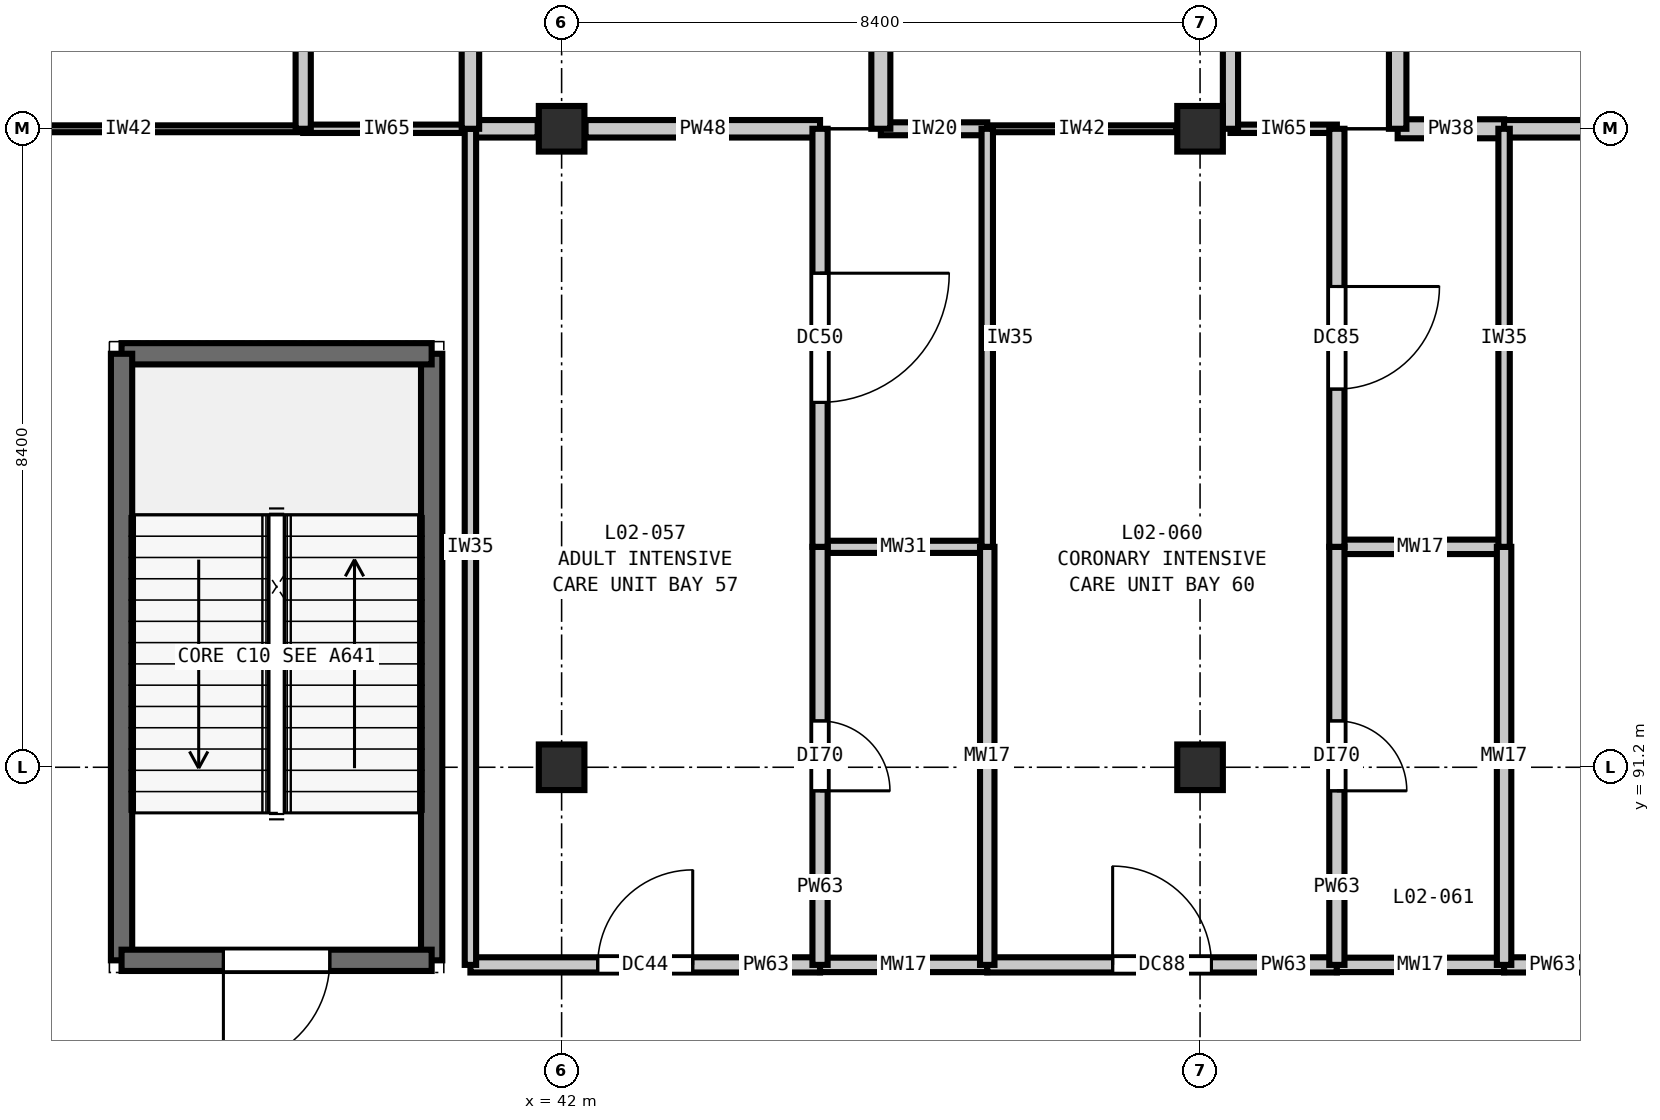
"""IFC4 building model, lengths in metres.
Left out: names, types, materials, properties, quantities, classifications, styles, units other than length and angle.
Written with IfcOpenShell. Run it as: python <this file> out.ifc"""

import sys

from ifc_helpers import new_model, si_unit, direction, frame, frame_2d, origin, origin_2d, place, context, subcontext, project, spatial, rectangle, extrude, element, fill, save


model = new_model("IFC4")
c1 = context("Model", 3, precision=1e-05, world=origin(), true_north=direction((0.0, 1.0)))
c2 = subcontext(c1, "Body", "Model", "MODEL_VIEW")
j1 = project(units=[si_unit("LENGTHUNIT", "METRE"), si_unit("PLANEANGLEUNIT", "RADIAN")], contexts=[c1])
p1 = place(None, origin())
s1 = spatial("IfcSite", under=j1, at=p1, CompositionType="ELEMENT")
p2 = place(p1, origin())
s2 = spatial("IfcBuilding", under=s1, at=p2, CompositionType="ELEMENT")
p3 = place(p2, frame((0.0, 0.0, 10.8)))
s3 = spatial("IfcBuildingStorey", under=s2, at=p3, CompositionType="ELEMENT", Elevation=10.8)
for number, where, z_axis, x_axis in (
    (1, (42.0, 91.2, 0.0), (0.0, 0.0, 1.0), (1.0, 0.0, 0.0)),
    (2, (42.0, 99.6, 0.0), (0.0, 0.0, 1.0), (1.0, 0.0, 0.0)),
    (3, (50.4, 91.2, 0.0), (0.0, 0.0, 1.0), (1.0, 0.0, 0.0)),
    (4, (50.4, 99.6, 0.0), (0.0, 0.0, 1.0), (1.0, 0.0, 0.0)),
):
    element("IfcColumn", number, at=place(p3, frame(where, z_axis=z_axis, x_axis=x_axis)), inside=s3, PredefinedType="COLUMN", context=c2, shape_type="SweptSolid", body=[
        extrude(rectangle(XDim=0.6, YDim=0.6, at=origin_2d()), origin(), (0.0, 0.0, 1.0), 5.4),
    ])
p4 = place(p3, frame((40.29, 88.66, 0.0), z_axis=(0.0, 0.0, 1.0), x_axis=(0.0, 1.0, 0.0)))
e5 = element("IfcWall", 5, at=p4, inside=s3, PredefinedType="SHEAR", context=c2, shape_type="SweptSolid", body=[
    extrude(rectangle(XDim=7.98, YDim=0.28, at=frame_2d((3.99, 0.0))), origin(), (0.0, 0.0, 1.0), 5.4),
])
p5 = place(p3, frame((40.29, 96.64, 0.0), z_axis=(0.0, 0.0, 1.0), x_axis=(-1.0, 0.0, 0.0)))
e6 = element("IfcWall", 6, at=p5, inside=s3, PredefinedType="SHEAR", context=c2, shape_type="SweptSolid", body=[
    extrude(rectangle(XDim=4.08, YDim=0.28, at=frame_2d((2.04, 0.0))), origin(), (0.0, 0.0, 1.0), 5.4),
])
p6 = place(p3, frame((36.21, 96.64, 0.0), z_axis=(0.0, 0.0, 1.0), x_axis=(0.0, -1.0, 0.0)))
e7 = element("IfcWall", 7, at=p6, inside=s3, PredefinedType="SHEAR", context=c2, shape_type="SweptSolid", body=[
    extrude(rectangle(XDim=7.98, YDim=0.28, at=frame_2d((3.99, 0.0))), origin(), (0.0, 0.0, 1.0), 5.4),
])
p7 = place(p3, frame((36.21, 88.66, 0.0), z_axis=(0.0, 0.0, 1.0), x_axis=(1.0, 0.0, 0.0)))
e8 = element("IfcWall", 8, at=p7, inside=s3, PredefinedType="SHEAR", context=c2, shape_type="SweptSolid", body=[
    extrude(rectangle(XDim=4.08, YDim=0.28, at=frame_2d((2.04, 0.0))), origin(), (0.0, 0.0, 1.0), 5.4),
])
p8 = place(p7, frame((1.34, 0.0, 0.0)))
e9 = element("IfcOpeningElement", 9, at=p8, cuts=e8, PredefinedType="OPENING", context=c2, shape_type="SweptSolid", body=[
    extrude(rectangle(XDim=1.4, YDim=2.2, at=frame_2d((0.7, 1.1))), frame((0.0, 0.15, 0.0), z_axis=(0.0, -1.0, 0.0), x_axis=(1.0, 0.0, 0.0)), (0.0, 0.0, 1.0), 0.3),
])
p9 = place(p3, frame((40.8, 88.6, 0.0), z_axis=(0.0, 0.0, 1.0), x_axis=(1.0, 0.0, 0.0)))
e10 = element("IfcWall", 10, at=p9, inside=s3, PredefinedType="PARTITIONING", context=c2, shape_type="SweptSolid", body=[
    extrude(rectangle(XDim=4.6, YDim=0.2, at=frame_2d((2.3, 0.0))), origin(), (0.0, 0.0, 1.0), 5.07),
])
p10 = place(p9, frame((1.675, 0.0, 0.0)))
e11 = element("IfcOpeningElement", 11, at=p10, cuts=e10, PredefinedType="OPENING", context=c2, shape_type="SweptSolid", body=[
    extrude(rectangle(XDim=1.25, YDim=2.15, at=frame_2d((0.625, 1.075))), frame((0.0, 0.11, 0.0), z_axis=(0.0, -1.0, 0.0), x_axis=(1.0, 0.0, 0.0)), (0.0, 0.0, 1.0), 0.22),
])
p11 = place(p3, frame((45.4, 88.6, 0.0), z_axis=(0.0, 0.0, 1.0), x_axis=(1.0, 0.0, 0.0)))
e12 = element("IfcWall", 12, at=p11, inside=s3, PredefinedType="PLUMBINGWALL", context=c2, shape_type="SweptSolid", body=[
    extrude(rectangle(XDim=2.2, YDim=0.19, at=frame_2d((1.1, 0.0))), origin(), (0.0, 0.0, 1.0), 5.07),
])
p12 = place(p3, frame((47.6, 88.6, 0.0), z_axis=(0.0, 0.0, 1.0), x_axis=(1.0, 0.0, 0.0)))
e13 = element("IfcWall", 13, at=p12, inside=s3, PredefinedType="PARTITIONING", context=c2, shape_type="SweptSolid", body=[
    extrude(rectangle(XDim=4.6, YDim=0.2, at=frame_2d((2.3, 0.0))), origin(), (0.0, 0.0, 1.0), 5.07),
])
p13 = place(p12, frame((1.65, 0.0, 0.0)))
e14 = element("IfcOpeningElement", 14, at=p13, cuts=e13, PredefinedType="OPENING", context=c2, shape_type="SweptSolid", body=[
    extrude(rectangle(XDim=1.3, YDim=2.2, at=frame_2d((0.65, 1.1))), frame((0.0, 0.11, 0.0), z_axis=(0.0, -1.0, 0.0), x_axis=(1.0, 0.0, 0.0)), (0.0, 0.0, 1.0), 0.22),
])
p14 = place(p3, frame((52.2, 88.6, 0.0), z_axis=(0.0, 0.0, 1.0), x_axis=(1.0, 0.0, 0.0)))
e15 = element("IfcWall", 15, at=p14, inside=s3, PredefinedType="PLUMBINGWALL", context=c2, shape_type="SweptSolid", body=[
    extrude(rectangle(XDim=2.2, YDim=0.19, at=frame_2d((1.1, 0.0))), origin(), (0.0, 0.0, 1.0), 5.07),
])
p15 = place(p3, frame((54.4, 88.6, 0.0), z_axis=(0.0, 0.0, 1.0), x_axis=(1.0, 0.0, 0.0)))
e16 = element("IfcWall", 16, at=p15, inside=s3, PredefinedType="PARTITIONING", context=c2, shape_type="SweptSolid", body=[
    extrude(rectangle(XDim=4.4, YDim=0.2, at=frame_2d((2.2, 0.0))), origin(), (0.0, 0.0, 1.0), 5.07),
])
p16 = place(p15, frame((1.525, 0.0, 0.0)))
e17 = element("IfcOpeningElement", 17, at=p16, cuts=e16, PredefinedType="OPENING", context=c2, shape_type="SweptSolid", body=[
    extrude(rectangle(XDim=1.35, YDim=2.2, at=frame_2d((0.675, 1.1))), frame((0.0, 0.11, 0.0), z_axis=(0.0, -1.0, 0.0), x_axis=(1.0, 0.0, 0.0)), (0.0, 0.0, 1.0), 0.22),
])
p17 = place(p3, frame((45.4, 94.1, 0.0), z_axis=(0.0, 0.0, 1.0), x_axis=(1.0, 0.0, 0.0)))
e18 = element("IfcWall", 18, at=p17, inside=s3, PredefinedType="PLUMBINGWALL", context=c2, shape_type="SweptSolid", body=[
    extrude(rectangle(XDim=2.2, YDim=0.16, at=frame_2d((1.1, 0.0))), origin(), (0.0, 0.0, 1.0), 5.07),
])
p18 = place(p3, frame((52.2, 94.1, 0.0), z_axis=(0.0, 0.0, 1.0), x_axis=(1.0, 0.0, 0.0)))
e19 = element("IfcWall", 19, at=p18, inside=s3, PredefinedType="PLUMBINGWALL", context=c2, shape_type="SweptSolid", body=[
    extrude(rectangle(XDim=2.2, YDim=0.19, at=frame_2d((1.1, 0.0))), origin(), (0.0, 0.0, 1.0), 5.07),
])
p19 = place(p3, frame((34.0, 99.6, 0.0), z_axis=(0.0, 0.0, 1.0), x_axis=(1.0, 0.0, 0.0)))
e20 = element("IfcWall", 20, at=p19, inside=s3, PredefinedType="PARTITIONING", context=c2, shape_type="SweptSolid", body=[
    extrude(rectangle(XDim=4.6, YDim=0.09, at=frame_2d((2.3, 0.0))), origin(), (0.0, 0.0, 1.0), 4.735),
])
p20 = place(p3, frame((38.6, 99.6, 0.0), z_axis=(0.0, 0.0, 1.0), x_axis=(1.0, 0.0, 0.0)))
e21 = element("IfcWall", 21, at=p20, inside=s3, PredefinedType="PARTITIONING", context=c2, shape_type="SweptSolid", body=[
    extrude(rectangle(XDim=2.2, YDim=0.11, at=frame_2d((1.1, 0.0))), origin(), (0.0, 0.0, 1.0), 4.735),
])
p21 = place(p3, frame((42.315, 99.6, 0.0), z_axis=(0.0, 0.0, 1.0), x_axis=(1.0, 0.0, 0.0)))
e22 = element("IfcWall", 22, at=p21, inside=s3, PredefinedType="PARTITIONING", context=c2, shape_type="SweptSolid", body=[
    extrude(rectangle(XDim=3.085, YDim=0.23, at=frame_2d((1.542, 0.0))), origin(), (0.0, 0.0, 1.0), 4.735),
])
p22 = place(p3, frame((40.8, 99.6, 0.0), z_axis=(0.0, 0.0, 1.0), x_axis=(1.0, 0.0, 0.0)))
e23 = element("IfcWall", 23, at=p22, inside=s3, PredefinedType="PARTITIONING", context=c2, shape_type="SweptSolid", body=[
    extrude(rectangle(XDim=0.885, YDim=0.23, at=frame_2d((0.442, 0.0))), origin(), (0.0, 0.0, 1.0), 4.735),
])
p23 = place(p3, frame((46.2, 99.6, 0.0), z_axis=(0.0, 0.0, 1.0), x_axis=(1.0, 0.0, 0.0)))
e24 = element("IfcWall", 24, at=p23, inside=s3, PredefinedType="PARTITIONING", context=c2, shape_type="SweptSolid", body=[
    extrude(rectangle(XDim=1.4, YDim=0.17, at=frame_2d((0.7, 0.0))), origin(), (0.0, 0.0, 1.0), 4.735),
])
p24 = place(p3, frame((47.6, 99.6, 0.0), z_axis=(0.0, 0.0, 1.0), x_axis=(1.0, 0.0, 0.0)))
e25 = element("IfcWall", 25, at=p24, inside=s3, PredefinedType="PARTITIONING", context=c2, shape_type="SweptSolid", body=[
    extrude(rectangle(XDim=2.485, YDim=0.09, at=frame_2d((1.242, 0.0))), origin(), (0.0, 0.0, 1.0), 4.735),
])
p25 = place(p3, frame((50.8, 99.6, 0.0), z_axis=(0.0, 0.0, 1.0), x_axis=(1.0, 0.0, 0.0)))
e26 = element("IfcWall", 26, at=p25, inside=s3, PredefinedType="PARTITIONING", context=c2, shape_type="SweptSolid", body=[
    extrude(rectangle(XDim=1.4, YDim=0.11, at=frame_2d((0.7, 0.0))), origin(), (0.0, 0.0, 1.0), 4.735),
])
p26 = place(p3, frame((53.0, 99.6, 0.0), z_axis=(0.0, 0.0, 1.0), x_axis=(1.0, 0.0, 0.0)))
e27 = element("IfcWall", 27, at=p26, inside=s3, PredefinedType="PARTITIONING", context=c2, shape_type="SweptSolid", body=[
    extrude(rectangle(XDim=1.4, YDim=0.25, at=frame_2d((0.7, 0.0))), origin(), (0.0, 0.0, 1.0), 4.735),
])
p27 = place(p3, frame((54.4, 99.6, 0.0), z_axis=(0.0, 0.0, 1.0), x_axis=(1.0, 0.0, 0.0)))
e28 = element("IfcWall", 28, at=p27, inside=s3, PredefinedType="PARTITIONING", context=c2, shape_type="SweptSolid", body=[
    extrude(rectangle(XDim=4.0, YDim=0.23, at=frame_2d((2.0, 0.0))), origin(), (0.0, 0.0, 1.0), 4.735),
])
p28 = place(p3, frame((38.6, 99.6, 0.0), z_axis=(0.0, 0.0, 1.0), x_axis=(0.0, 1.0, 0.0)))
e29 = element("IfcWall", 29, at=p28, inside=s3, PredefinedType="PARTITIONING", context=c2, shape_type="SweptSolid", body=[
    extrude(rectangle(XDim=6.8, YDim=0.2, at=frame_2d((3.4, 0.0))), origin(), (0.0, 0.0, 1.0), 5.07),
])
p29 = place(p28, frame((2.725, 0.0, 0.0)))
e30 = element("IfcOpeningElement", 30, at=p29, cuts=e29, PredefinedType="OPENING", context=c2, shape_type="SweptSolid", body=[
    extrude(rectangle(XDim=1.35, YDim=2.2, at=frame_2d((0.675, 1.1))), frame((0.0, 0.11, 0.0), z_axis=(0.0, -1.0, 0.0), x_axis=(1.0, 0.0, 0.0)), (0.0, 0.0, 1.0), 0.22),
])
p30 = place(p3, frame((40.8, 88.6, 0.0), z_axis=(0.0, 0.0, 1.0), x_axis=(0.0, 1.0, 0.0)))
e31 = element("IfcWall", 31, at=p30, inside=s3, PredefinedType="PARTITIONING", context=c2, shape_type="SweptSolid", body=[
    extrude(rectangle(XDim=11.0, YDim=0.15, at=frame_2d((5.5, 0.0))), origin(), (0.0, 0.0, 1.0), 5.07),
])
p31 = place(p3, frame((40.8, 99.6, 0.0), z_axis=(0.0, 0.0, 1.0), x_axis=(0.0, 1.0, 0.0)))
e32 = element("IfcWall", 32, at=p31, inside=s3, PredefinedType="PARTITIONING", context=c2, shape_type="SweptSolid", body=[
    extrude(rectangle(XDim=6.8, YDim=0.23, at=frame_2d((3.4, 0.0))), origin(), (0.0, 0.0, 1.0), 5.07),
])
p32 = place(p3, frame((45.4, 88.6, 0.0), z_axis=(0.0, 0.0, 1.0), x_axis=(0.0, 1.0, 0.0)))
e33 = element("IfcWall", 33, at=p32, inside=s3, PredefinedType="PARTITIONING", context=c2, shape_type="SweptSolid", body=[
    extrude(rectangle(XDim=5.5, YDim=0.2, at=frame_2d((2.75, 0.0))), origin(), (0.0, 0.0, 1.0), 5.07),
])
p33 = place(p32, frame((2.29, 0.0, 0.0)))
e34 = element("IfcOpeningElement", 34, at=p33, cuts=e33, PredefinedType="OPENING", context=c2, shape_type="SweptSolid", body=[
    extrude(rectangle(XDim=0.92, YDim=2.1, at=frame_2d((0.46, 1.05))), frame((0.0, 0.11, 0.0), z_axis=(0.0, -1.0, 0.0), x_axis=(1.0, 0.0, 0.0)), (0.0, 0.0, 1.0), 0.22),
])
p34 = place(p3, frame((45.4, 94.1, 0.0), z_axis=(0.0, 0.0, 1.0), x_axis=(0.0, 1.0, 0.0)))
e35 = element("IfcWall", 35, at=p34, inside=s3, PredefinedType="PARTITIONING", context=c2, shape_type="SweptSolid", body=[
    extrude(rectangle(XDim=5.5, YDim=0.2, at=frame_2d((2.75, 0.0))), origin(), (0.0, 0.0, 1.0), 5.07),
])
p35 = place(p34, frame((1.9, 0.0, 0.0)))
e36 = element("IfcOpeningElement", 36, at=p35, cuts=e35, PredefinedType="OPENING", context=c2, shape_type="SweptSolid", body=[
    extrude(rectangle(XDim=1.7, YDim=2.3, at=frame_2d((0.85, 1.15))), frame((0.0, 0.11, 0.0), z_axis=(0.0, -1.0, 0.0), x_axis=(1.0, 0.0, 0.0)), (0.0, 0.0, 1.0), 0.22),
])
p36 = place(p3, frame((46.2, 99.6, 0.0), z_axis=(0.0, 0.0, 1.0), x_axis=(0.0, 1.0, 0.0)))
e37 = element("IfcWall", 37, at=p36, inside=s3, PredefinedType="PARTITIONING", context=c2, shape_type="SweptSolid", body=[
    extrude(rectangle(XDim=13.6, YDim=0.25, at=frame_2d((6.8, 0.0))), origin(), (0.0, 0.0, 1.0), 5.07),
])
p37 = place(p3, frame((47.6, 88.6, 0.0), z_axis=(0.0, 0.0, 1.0), x_axis=(0.0, 1.0, 0.0)))
e38 = element("IfcWall", 38, at=p37, inside=s3, PredefinedType="PLUMBINGWALL", context=c2, shape_type="SweptSolid", body=[
    extrude(rectangle(XDim=5.5, YDim=0.19, at=frame_2d((2.75, 0.0))), origin(), (0.0, 0.0, 1.0), 5.07),
])
p38 = place(p3, frame((47.6, 94.1, 0.0), z_axis=(0.0, 0.0, 1.0), x_axis=(0.0, 1.0, 0.0)))
e39 = element("IfcWall", 39, at=p38, inside=s3, PredefinedType="PARTITIONING", context=c2, shape_type="SweptSolid", body=[
    extrude(rectangle(XDim=5.5, YDim=0.15, at=frame_2d((2.75, 0.0))), origin(), (0.0, 0.0, 1.0), 5.07),
])
p39 = place(p3, frame((50.8, 99.6, 0.0), z_axis=(0.0, 0.0, 1.0), x_axis=(0.0, 1.0, 0.0)))
e40 = element("IfcWall", 40, at=p39, inside=s3, PredefinedType="PARTITIONING", context=c2, shape_type="SweptSolid", body=[
    extrude(rectangle(XDim=6.8, YDim=0.2, at=frame_2d((3.4, 0.0))), origin(), (0.0, 0.0, 1.0), 5.07),
])
p40 = place(p39, frame((3.816, 0.0, 0.0)))
e41 = element("IfcOpeningElement", 41, at=p40, cuts=e40, PredefinedType="OPENING", context=c2, shape_type="SweptSolid", body=[
    extrude(rectangle(XDim=1.85, YDim=2.3, at=frame_2d((0.925, 1.15))), frame((0.0, 0.11, 0.0), z_axis=(0.0, -1.0, 0.0), x_axis=(1.0, 0.0, 0.0)), (0.0, 0.0, 1.0), 0.22),
])
p41 = place(p3, frame((52.2, 88.6, 0.0), z_axis=(0.0, 0.0, 1.0), x_axis=(0.0, 1.0, 0.0)))
e42 = element("IfcWall", 42, at=p41, inside=s3, PredefinedType="PARTITIONING", context=c2, shape_type="SweptSolid", body=[
    extrude(rectangle(XDim=5.5, YDim=0.2, at=frame_2d((2.75, 0.0))), origin(), (0.0, 0.0, 1.0), 5.07),
])
p42 = place(p41, frame((2.29, 0.0, 0.0)))
e43 = element("IfcOpeningElement", 43, at=p42, cuts=e42, PredefinedType="OPENING", context=c2, shape_type="SweptSolid", body=[
    extrude(rectangle(XDim=0.92, YDim=2.1, at=frame_2d((0.46, 1.05))), frame((0.0, 0.11, 0.0), z_axis=(0.0, -1.0, 0.0), x_axis=(1.0, 0.0, 0.0)), (0.0, 0.0, 1.0), 0.22),
])
p43 = place(p3, frame((52.2, 94.1, 0.0), z_axis=(0.0, 0.0, 1.0), x_axis=(0.0, 1.0, 0.0)))
e44 = element("IfcWall", 44, at=p43, inside=s3, PredefinedType="PARTITIONING", context=c2, shape_type="SweptSolid", body=[
    extrude(rectangle(XDim=5.5, YDim=0.2, at=frame_2d((2.75, 0.0))), origin(), (0.0, 0.0, 1.0), 5.07),
])
p44 = place(p43, frame((2.075, 0.0, 0.0)))
e45 = element("IfcOpeningElement", 45, at=p44, cuts=e44, PredefinedType="OPENING", context=c2, shape_type="SweptSolid", body=[
    extrude(rectangle(XDim=1.35, YDim=2.2, at=frame_2d((0.675, 1.1))), frame((0.0, 0.11, 0.0), z_axis=(0.0, -1.0, 0.0), x_axis=(1.0, 0.0, 0.0)), (0.0, 0.0, 1.0), 0.22),
])
p45 = place(p3, frame((53.0, 99.6, 0.0), z_axis=(0.0, 0.0, 1.0), x_axis=(0.0, 1.0, 0.0)))
e46 = element("IfcWall", 46, at=p45, inside=s3, PredefinedType="PARTITIONING", context=c2, shape_type="SweptSolid", body=[
    extrude(rectangle(XDim=6.8, YDim=0.23, at=frame_2d((3.4, 0.0))), origin(), (0.0, 0.0, 1.0), 5.07),
])
p46 = place(p3, frame((54.4, 88.6, 0.0), z_axis=(0.0, 0.0, 1.0), x_axis=(0.0, 1.0, 0.0)))
e47 = element("IfcWall", 47, at=p46, inside=s3, PredefinedType="PLUMBINGWALL", context=c2, shape_type="SweptSolid", body=[
    extrude(rectangle(XDim=5.5, YDim=0.19, at=frame_2d((2.75, 0.0))), origin(), (0.0, 0.0, 1.0), 5.07),
])
p47 = place(p3, frame((54.4, 94.1, 0.0), z_axis=(0.0, 0.0, 1.0), x_axis=(0.0, 1.0, 0.0)))
e48 = element("IfcWall", 48, at=p47, inside=s3, PredefinedType="PARTITIONING", context=c2, shape_type="SweptSolid", body=[
    extrude(rectangle(XDim=5.5, YDim=0.15, at=frame_2d((2.75, 0.0))), origin(), (0.0, 0.0, 1.0), 5.07),
])
p48 = place(p8, frame((1.4, 0.0, 0.0), z_axis=(0.0, 0.0, 1.0), x_axis=(-1.0, 0.0, 0.0)))
e49 = element("IfcDoor", 49, at=p48, inside=s3, OperationType="SINGLE_SWING_RIGHT", PredefinedType="DOOR", context=c2, shape_type="SweptSolid", body=[
    extrude(rectangle(XDim=1.4, YDim=2.2, at=frame_2d((0.7, 1.1))), frame((0.0, 0.025, 0.0), z_axis=(0.0, -1.0, 0.0), x_axis=(1.0, 0.0, 0.0)), (0.0, 0.0, 1.0), 0.05),
])
fill(e9, e49)
p49 = place(p10, origin())
e50 = element("IfcDoor", 50, at=p49, inside=s3, OperationType="SINGLE_SWING_RIGHT", PredefinedType="DOOR", context=c2, shape_type="SweptSolid", body=[
    extrude(rectangle(XDim=1.25, YDim=2.15, at=frame_2d((0.625, 1.075))), frame((0.0, 0.025, 0.0), z_axis=(0.0, -1.0, 0.0), x_axis=(1.0, 0.0, 0.0)), (0.0, 0.0, 1.0), 0.05),
])
fill(e11, e50)
p50 = place(p13, origin())
e51 = element("IfcDoor", 51, at=p50, inside=s3, OperationType="SINGLE_SWING_LEFT", PredefinedType="DOOR", context=c2, shape_type="SweptSolid", body=[
    extrude(rectangle(XDim=1.3, YDim=2.2, at=frame_2d((0.65, 1.1))), frame((0.0, 0.025, 0.0), z_axis=(0.0, -1.0, 0.0), x_axis=(1.0, 0.0, 0.0)), (0.0, 0.0, 1.0), 0.05),
])
fill(e14, e51)
p51 = place(p33, frame((0.92, 0.0, 0.0), z_axis=(0.0, 0.0, 1.0), x_axis=(-1.0, 0.0, 0.0)))
e52 = element("IfcDoor", 52, at=p51, inside=s3, OperationType="SINGLE_SWING_RIGHT", PredefinedType="DOOR", context=c2, shape_type="SweptSolid", body=[
    extrude(rectangle(XDim=0.92, YDim=2.1, at=frame_2d((0.46, 1.05))), frame((0.0, 0.025, 0.0), z_axis=(0.0, -1.0, 0.0), x_axis=(1.0, 0.0, 0.0)), (0.0, 0.0, 1.0), 0.05),
])
fill(e34, e52)
p52 = place(p35, frame((1.7, 0.0, 0.0), z_axis=(0.0, 0.0, 1.0), x_axis=(-1.0, 0.0, 0.0)))
e53 = element("IfcDoor", 53, at=p52, inside=s3, OperationType="SINGLE_SWING_LEFT", PredefinedType="DOOR", context=c2, shape_type="SweptSolid", body=[
    extrude(rectangle(XDim=1.7, YDim=2.3, at=frame_2d((0.85, 1.15))), frame((0.0, 0.025, 0.0), z_axis=(0.0, -1.0, 0.0), x_axis=(1.0, 0.0, 0.0)), (0.0, 0.0, 1.0), 0.05),
])
fill(e36, e53)
p53 = place(p42, frame((0.92, 0.0, 0.0), z_axis=(0.0, 0.0, 1.0), x_axis=(-1.0, 0.0, 0.0)))
e54 = element("IfcDoor", 54, at=p53, inside=s3, OperationType="SINGLE_SWING_RIGHT", PredefinedType="DOOR", context=c2, shape_type="SweptSolid", body=[
    extrude(rectangle(XDim=0.92, YDim=2.1, at=frame_2d((0.46, 1.05))), frame((0.0, 0.025, 0.0), z_axis=(0.0, -1.0, 0.0), x_axis=(1.0, 0.0, 0.0)), (0.0, 0.0, 1.0), 0.05),
])
fill(e43, e54)
p54 = place(p44, frame((1.35, 0.0, 0.0), z_axis=(0.0, 0.0, 1.0), x_axis=(-1.0, 0.0, 0.0)))
e55 = element("IfcDoor", 55, at=p54, inside=s3, OperationType="SINGLE_SWING_LEFT", PredefinedType="DOOR", context=c2, shape_type="SweptSolid", body=[
    extrude(rectangle(XDim=1.35, YDim=2.2, at=frame_2d((0.675, 1.1))), frame((0.0, 0.025, 0.0), z_axis=(0.0, -1.0, 0.0), x_axis=(1.0, 0.0, 0.0)), (0.0, 0.0, 1.0), 0.05),
])
fill(e45, e55)
save(model, sys.argv[1])
